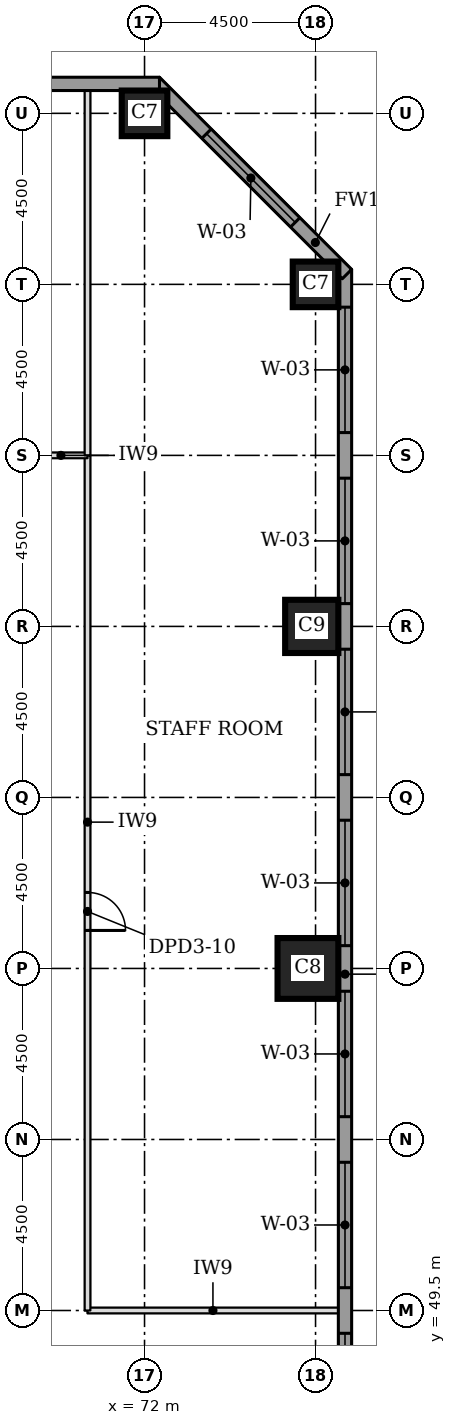
"""IFC4 building model, lengths in metres.
Left out: names, types, materials, properties, quantities, classifications, styles, units other than length and angle.
Written with IfcOpenShell. Run it as: python <this file> out.ifc"""

import sys

from ifc_helpers import new_model, si_unit, direction, frame, frame_2d, origin, origin_2d, place, context, subcontext, project, spatial, rectangle, extrude, element, fill, save


model = new_model("IFC4")
c1 = context("Model", 3, precision=1e-05, world=origin(), true_north=direction((0.0, 1.0)))
c2 = subcontext(c1, "Body", "Model", "MODEL_VIEW")
j1 = project(units=[si_unit("LENGTHUNIT", "METRE"), si_unit("PLANEANGLEUNIT", "RADIAN")], contexts=[c1])
p1 = place(None, origin())
s1 = spatial("IfcSite", under=j1, at=p1, CompositionType="ELEMENT")
p2 = place(p1, origin())
s2 = spatial("IfcBuilding", under=s1, at=p2, CompositionType="ELEMENT")
p3 = place(p2, frame((0.0, 0.0, 18.5)))
s3 = spatial("IfcBuildingStorey", under=s2, at=p3, CompositionType="ELEMENT", Elevation=18.5)
p4 = place(p3, frame((76.3, 58.5, 0.0), z_axis=(0.0, 0.0, 1.0), x_axis=(1.0, 0.0, 0.0)))
e1 = element("IfcColumn", 1, at=p4, inside=s3, PredefinedType="COLUMN", context=c2, shape_type="SweptSolid", body=[
    extrude(rectangle(XDim=1.6, YDim=1.6, at=origin_2d()), origin(), (0.0, 0.0, 1.0), 4.6),
])
p5 = place(p3, frame((76.4, 67.5, 0.0), z_axis=(0.0, 0.0, 1.0), x_axis=(1.0, 0.0, 0.0)))
e2 = element("IfcColumn", 2, at=p5, inside=s3, PredefinedType="COLUMN", context=c2, shape_type="SweptSolid", body=[
    extrude(rectangle(XDim=1.4, YDim=1.4, at=origin_2d()), origin(), (0.0, 0.0, 1.0), 4.6),
])
for number, where, z_axis, x_axis in (
    (3, (76.5, 76.5, 0.0), (0.0, 0.0, 1.0), (1.0, 0.0, 0.0)),
    (4, (72.0, 81.0, 0.0), (0.0, 0.0, 1.0), (1.0, 0.0, 0.0)),
):
    element("IfcColumn", number, at=place(p3, frame(where, z_axis=z_axis, x_axis=x_axis)), inside=s3, PredefinedType="COLUMN", context=c2, shape_type="SweptSolid", body=[
        extrude(rectangle(XDim=1.2, YDim=1.2, at=origin_2d()), origin(), (0.0, 0.0, 1.0), 4.6),
    ])
p6 = place(p3, frame((77.275, 44.606, 0.0), z_axis=(0.0, 0.0, 1.0), x_axis=(0.0, 1.0, 0.0)))
e5 = element("IfcWall", 5, at=p6, inside=s3, PredefinedType="STANDARD", context=c2, shape_type="SweptSolid", body=[
    extrude(rectangle(XDim=32.287, YDim=0.35, at=frame_2d((16.144, 0.0))), origin(), (0.0, 0.0, 1.0), 4.355),
])
p7 = place(p6, frame((0.993, 0.0, 0.9)))
e6 = element("IfcOpeningElement", 6, at=p7, cuts=e5, PredefinedType="OPENING", context=c2, shape_type="SweptSolid", body=[
    extrude(rectangle(XDim=3.3, YDim=2.7, at=frame_2d((1.65, 1.35))), frame((0.0, 0.185, 0.0), z_axis=(0.0, -1.0, 0.0), x_axis=(1.0, 0.0, 0.0)), (0.0, 0.0, 1.0), 0.37),
])
p8 = place(p6, frame((5.493, 0.0, 0.9)))
e7 = element("IfcOpeningElement", 7, at=p8, cuts=e5, PredefinedType="OPENING", context=c2, shape_type="SweptSolid", body=[
    extrude(rectangle(XDim=3.3, YDim=2.7, at=frame_2d((1.65, 1.35))), frame((0.0, 0.185, 0.0), z_axis=(0.0, -1.0, 0.0), x_axis=(1.0, 0.0, 0.0)), (0.0, 0.0, 1.0), 0.37),
])
p9 = place(p6, frame((9.993, 0.0, 0.9)))
e8 = element("IfcOpeningElement", 8, at=p9, cuts=e5, PredefinedType="OPENING", context=c2, shape_type="SweptSolid", body=[
    extrude(rectangle(XDim=3.3, YDim=2.7, at=frame_2d((1.65, 1.35))), frame((0.0, 0.185, 0.0), z_axis=(0.0, -1.0, 0.0), x_axis=(1.0, 0.0, 0.0)), (0.0, 0.0, 1.0), 0.37),
])
p10 = place(p6, frame((14.493, 0.0, 0.9)))
e9 = element("IfcOpeningElement", 9, at=p10, cuts=e5, PredefinedType="OPENING", context=c2, shape_type="SweptSolid", body=[
    extrude(rectangle(XDim=3.3, YDim=2.7, at=frame_2d((1.65, 1.35))), frame((0.0, 0.185, 0.0), z_axis=(0.0, -1.0, 0.0), x_axis=(1.0, 0.0, 0.0)), (0.0, 0.0, 1.0), 0.37),
])
p11 = place(p6, frame((18.993, 0.0, 0.9)))
e10 = element("IfcOpeningElement", 10, at=p11, cuts=e5, PredefinedType="OPENING", context=c2, shape_type="SweptSolid", body=[
    extrude(rectangle(XDim=3.3, YDim=2.7, at=frame_2d((1.65, 1.35))), frame((0.0, 0.185, 0.0), z_axis=(0.0, -1.0, 0.0), x_axis=(1.0, 0.0, 0.0)), (0.0, 0.0, 1.0), 0.37),
])
p12 = place(p6, frame((23.493, 0.0, 0.9)))
e11 = element("IfcOpeningElement", 11, at=p12, cuts=e5, PredefinedType="OPENING", context=c2, shape_type="SweptSolid", body=[
    extrude(rectangle(XDim=3.3, YDim=2.7, at=frame_2d((1.65, 1.35))), frame((0.0, 0.185, 0.0), z_axis=(0.0, -1.0, 0.0), x_axis=(1.0, 0.0, 0.0)), (0.0, 0.0, 1.0), 0.37),
])
p13 = place(p6, frame((27.993, 0.0, 0.9)))
e12 = element("IfcOpeningElement", 12, at=p13, cuts=e5, PredefinedType="OPENING", context=c2, shape_type="SweptSolid", body=[
    extrude(rectangle(XDim=3.3, YDim=2.7, at=frame_2d((1.65, 1.35))), frame((0.0, 0.185, 0.0), z_axis=(0.0, -1.0, 0.0), x_axis=(1.0, 0.0, 0.0)), (0.0, 0.0, 1.0), 0.37),
])
p14 = place(p3, frame((77.326, 76.77, 0.0), z_axis=(0.0, 0.0, 1.0), x_axis=(-0.707106781187, 0.707106781187, 0.0)))
e13 = element("IfcWall", 13, at=p14, inside=s3, PredefinedType="STANDARD", context=c2, shape_type="SweptSolid", body=[
    extrude(rectangle(XDim=7.151, YDim=0.35, at=frame_2d((3.576, 0.0))), origin(), (0.0, 0.0, 1.0), 4.355),
])
p15 = place(p14, frame((1.926, 0.0, 0.9)))
e14 = element("IfcOpeningElement", 14, at=p15, cuts=e13, PredefinedType="OPENING", context=c2, shape_type="SweptSolid", body=[
    extrude(rectangle(XDim=3.3, YDim=2.7, at=frame_2d((1.65, 1.35))), frame((0.0, 0.185, 0.0), z_axis=(0.0, -1.0, 0.0), x_axis=(1.0, 0.0, 0.0)), (0.0, 0.0, 1.0), 0.37),
])
p16 = place(p3, frame((72.394, 81.775, 0.0), z_axis=(0.0, 0.0, 1.0), x_axis=(-1.0, 0.0, 0.0)))
e15 = element("IfcWall", 15, at=p16, inside=s3, PredefinedType="STANDARD", context=c2, shape_type="SweptSolid", body=[
    extrude(rectangle(XDim=32.287, YDim=0.35, at=frame_2d((16.144, 0.0))), origin(), (0.0, 0.0, 1.0), 4.355),
])
p17 = place(p16, frame((5.493, 0.0, 0.9)))
e16 = element("IfcOpeningElement", 16, at=p17, cuts=e15, PredefinedType="OPENING", context=c2, shape_type="SweptSolid", body=[
    extrude(rectangle(XDim=3.3, YDim=2.7, at=frame_2d((1.65, 1.35))), frame((0.0, 0.185, 0.0), z_axis=(0.0, -1.0, 0.0), x_axis=(1.0, 0.0, 0.0)), (0.0, 0.0, 1.0), 0.37),
])
p18 = place(p16, frame((9.993, 0.0, 0.9)))
e17 = element("IfcOpeningElement", 17, at=p18, cuts=e15, PredefinedType="OPENING", context=c2, shape_type="SweptSolid", body=[
    extrude(rectangle(XDim=3.3, YDim=2.7, at=frame_2d((1.65, 1.35))), frame((0.0, 0.185, 0.0), z_axis=(0.0, -1.0, 0.0), x_axis=(1.0, 0.0, 0.0)), (0.0, 0.0, 1.0), 0.37),
])
p19 = place(p16, frame((14.493, 0.0, 0.9)))
e18 = element("IfcOpeningElement", 18, at=p19, cuts=e15, PredefinedType="OPENING", context=c2, shape_type="SweptSolid", body=[
    extrude(rectangle(XDim=3.3, YDim=2.7, at=frame_2d((1.65, 1.35))), frame((0.0, 0.185, 0.0), z_axis=(0.0, -1.0, 0.0), x_axis=(1.0, 0.0, 0.0)), (0.0, 0.0, 1.0), 0.37),
])
p20 = place(p16, frame((18.993, 0.0, 0.9)))
e19 = element("IfcOpeningElement", 19, at=p20, cuts=e15, PredefinedType="OPENING", context=c2, shape_type="SweptSolid", body=[
    extrude(rectangle(XDim=3.3, YDim=2.7, at=frame_2d((1.65, 1.35))), frame((0.0, 0.185, 0.0), z_axis=(0.0, -1.0, 0.0), x_axis=(1.0, 0.0, 0.0)), (0.0, 0.0, 1.0), 0.37),
])
p21 = place(p16, frame((23.493, 0.0, 0.9)))
e20 = element("IfcOpeningElement", 20, at=p21, cuts=e15, PredefinedType="OPENING", context=c2, shape_type="SweptSolid", body=[
    extrude(rectangle(XDim=3.3, YDim=2.7, at=frame_2d((1.65, 1.35))), frame((0.0, 0.185, 0.0), z_axis=(0.0, -1.0, 0.0), x_axis=(1.0, 0.0, 0.0)), (0.0, 0.0, 1.0), 0.37),
])
p22 = place(p3, frame((70.5, 49.5, 0.0), z_axis=(0.0, 0.0, 1.0), x_axis=(1.0, 0.0, 0.0)))
e21 = element("IfcWall", 21, at=p22, inside=s3, PredefinedType="PARTITIONING", context=c2, shape_type="SweptSolid", body=[
    extrude(rectangle(XDim=6.6, YDim=0.15, at=frame_2d((3.3, 0.0))), origin(), (0.0, 0.0, 1.0), 4.38),
])
p23 = place(p3, frame((70.5, 49.5, 0.0), z_axis=(0.0, 0.0, 1.0), x_axis=(0.0, 1.0, 0.0)))
e22 = element("IfcWall", 22, at=p23, inside=s3, PredefinedType="PARTITIONING", context=c2, shape_type="SweptSolid", body=[
    extrude(rectangle(XDim=22.5, YDim=0.15, at=frame_2d((11.25, 0.0))), origin(), (0.0, 0.0, 1.0), 4.38),
])
p24 = place(p23, frame((10.0, 0.0, 0.0)))
e23 = element("IfcOpeningElement", 23, at=p24, cuts=e22, PredefinedType="OPENING", context=c2, shape_type="SweptSolid", body=[
    extrude(rectangle(XDim=1.0, YDim=2.1, at=frame_2d((0.5, 1.05))), frame((0.0, 0.085, 0.0), z_axis=(0.0, -1.0, 0.0), x_axis=(1.0, 0.0, 0.0)), (0.0, 0.0, 1.0), 0.17),
])
p25 = place(p3, frame((67.5, 72.0, 0.0), z_axis=(0.0, 0.0, 1.0), x_axis=(1.0, 0.0, 0.0)))
e24 = element("IfcWall", 24, at=p25, inside=s3, PredefinedType="PARTITIONING", context=c2, shape_type="SweptSolid", body=[
    extrude(rectangle(XDim=3.0, YDim=0.15, at=frame_2d((1.5, 0.0))), origin(), (0.0, 0.0, 1.0), 4.38),
])
p26 = place(p25, frame((0.2, 0.0, 0.0)))
e25 = element("IfcOpeningElement", 25, at=p26, cuts=e24, PredefinedType="OPENING", context=c2, shape_type="SweptSolid", body=[
    extrude(rectangle(XDim=1.0, YDim=2.1, at=frame_2d((0.5, 1.05))), frame((0.0, 0.085, 0.0), z_axis=(0.0, -1.0, 0.0), x_axis=(1.0, 0.0, 0.0)), (0.0, 0.0, 1.0), 0.17),
])
p27 = place(p3, frame((70.5, 72.0, 0.0), z_axis=(0.0, 0.0, 1.0), x_axis=(0.0, 1.0, 0.0)))
e26 = element("IfcWall", 26, at=p27, inside=s3, PredefinedType="PARTITIONING", context=c2, shape_type="SweptSolid", body=[
    extrude(rectangle(XDim=9.6, YDim=0.15, at=frame_2d((4.8, 0.0))), origin(), (0.0, 0.0, 1.0), 4.38),
])
p28 = place(p7, origin())
e27 = element("IfcWindow", 27, at=p28, inside=s3, PartitioningType="SINGLE_PANEL", PredefinedType="WINDOW", context=c2, shape_type="SweptSolid", body=[
    extrude(rectangle(XDim=3.3, YDim=2.7, at=frame_2d((1.65, 1.35))), frame((0.0, 0.085, 0.0), z_axis=(0.0, -1.0, 0.0), x_axis=(1.0, 0.0, 0.0)), (0.0, 0.0, 1.0), 0.06),
])
fill(e6, e27)
p29 = place(p8, origin())
e28 = element("IfcWindow", 28, at=p29, inside=s3, PartitioningType="SINGLE_PANEL", PredefinedType="WINDOW", context=c2, shape_type="SweptSolid", body=[
    extrude(rectangle(XDim=3.3, YDim=2.7, at=frame_2d((1.65, 1.35))), frame((0.0, 0.085, 0.0), z_axis=(0.0, -1.0, 0.0), x_axis=(1.0, 0.0, 0.0)), (0.0, 0.0, 1.0), 0.06),
])
fill(e7, e28)
p30 = place(p9, origin())
e29 = element("IfcWindow", 29, at=p30, inside=s3, PartitioningType="SINGLE_PANEL", PredefinedType="WINDOW", context=c2, shape_type="SweptSolid", body=[
    extrude(rectangle(XDim=3.3, YDim=2.7, at=frame_2d((1.65, 1.35))), frame((0.0, 0.085, 0.0), z_axis=(0.0, -1.0, 0.0), x_axis=(1.0, 0.0, 0.0)), (0.0, 0.0, 1.0), 0.06),
])
fill(e8, e29)
p31 = place(p10, origin())
e30 = element("IfcWindow", 30, at=p31, inside=s3, PartitioningType="SINGLE_PANEL", PredefinedType="WINDOW", context=c2, shape_type="SweptSolid", body=[
    extrude(rectangle(XDim=3.3, YDim=2.7, at=frame_2d((1.65, 1.35))), frame((0.0, 0.085, 0.0), z_axis=(0.0, -1.0, 0.0), x_axis=(1.0, 0.0, 0.0)), (0.0, 0.0, 1.0), 0.06),
])
fill(e9, e30)
p32 = place(p11, origin())
e31 = element("IfcWindow", 31, at=p32, inside=s3, PartitioningType="SINGLE_PANEL", PredefinedType="WINDOW", context=c2, shape_type="SweptSolid", body=[
    extrude(rectangle(XDim=3.3, YDim=2.7, at=frame_2d((1.65, 1.35))), frame((0.0, 0.085, 0.0), z_axis=(0.0, -1.0, 0.0), x_axis=(1.0, 0.0, 0.0)), (0.0, 0.0, 1.0), 0.06),
])
fill(e10, e31)
p33 = place(p12, origin())
e32 = element("IfcWindow", 32, at=p33, inside=s3, PartitioningType="SINGLE_PANEL", PredefinedType="WINDOW", context=c2, shape_type="SweptSolid", body=[
    extrude(rectangle(XDim=3.3, YDim=2.7, at=frame_2d((1.65, 1.35))), frame((0.0, 0.085, 0.0), z_axis=(0.0, -1.0, 0.0), x_axis=(1.0, 0.0, 0.0)), (0.0, 0.0, 1.0), 0.06),
])
fill(e11, e32)
p34 = place(p13, origin())
e33 = element("IfcWindow", 33, at=p34, inside=s3, PartitioningType="SINGLE_PANEL", PredefinedType="WINDOW", context=c2, shape_type="SweptSolid", body=[
    extrude(rectangle(XDim=3.3, YDim=2.7, at=frame_2d((1.65, 1.35))), frame((0.0, 0.085, 0.0), z_axis=(0.0, -1.0, 0.0), x_axis=(1.0, 0.0, 0.0)), (0.0, 0.0, 1.0), 0.06),
])
fill(e12, e33)
p35 = place(p15, origin())
e34 = element("IfcWindow", 34, at=p35, inside=s3, PartitioningType="SINGLE_PANEL", PredefinedType="WINDOW", context=c2, shape_type="SweptSolid", body=[
    extrude(rectangle(XDim=3.3, YDim=2.7, at=frame_2d((1.65, 1.35))), frame((0.0, 0.085, 0.0), z_axis=(0.0, -1.0, 0.0), x_axis=(1.0, 0.0, 0.0)), (0.0, 0.0, 1.0), 0.06),
])
fill(e14, e34)
p36 = place(p24, frame((1.0, 0.0, 0.0), z_axis=(0.0, 0.0, 1.0), x_axis=(-1.0, 0.0, 0.0)))
e35 = element("IfcDoor", 35, at=p36, inside=s3, OperationType="SINGLE_SWING_RIGHT", PredefinedType="DOOR", context=c2, shape_type="SweptSolid", body=[
    extrude(rectangle(XDim=1.0, YDim=2.1, at=frame_2d((0.5, 1.05))), frame((0.0, 0.025, 0.0), z_axis=(0.0, -1.0, 0.0), x_axis=(1.0, 0.0, 0.0)), (0.0, 0.0, 1.0), 0.05),
])
fill(e23, e35)
save(model, sys.argv[1])
